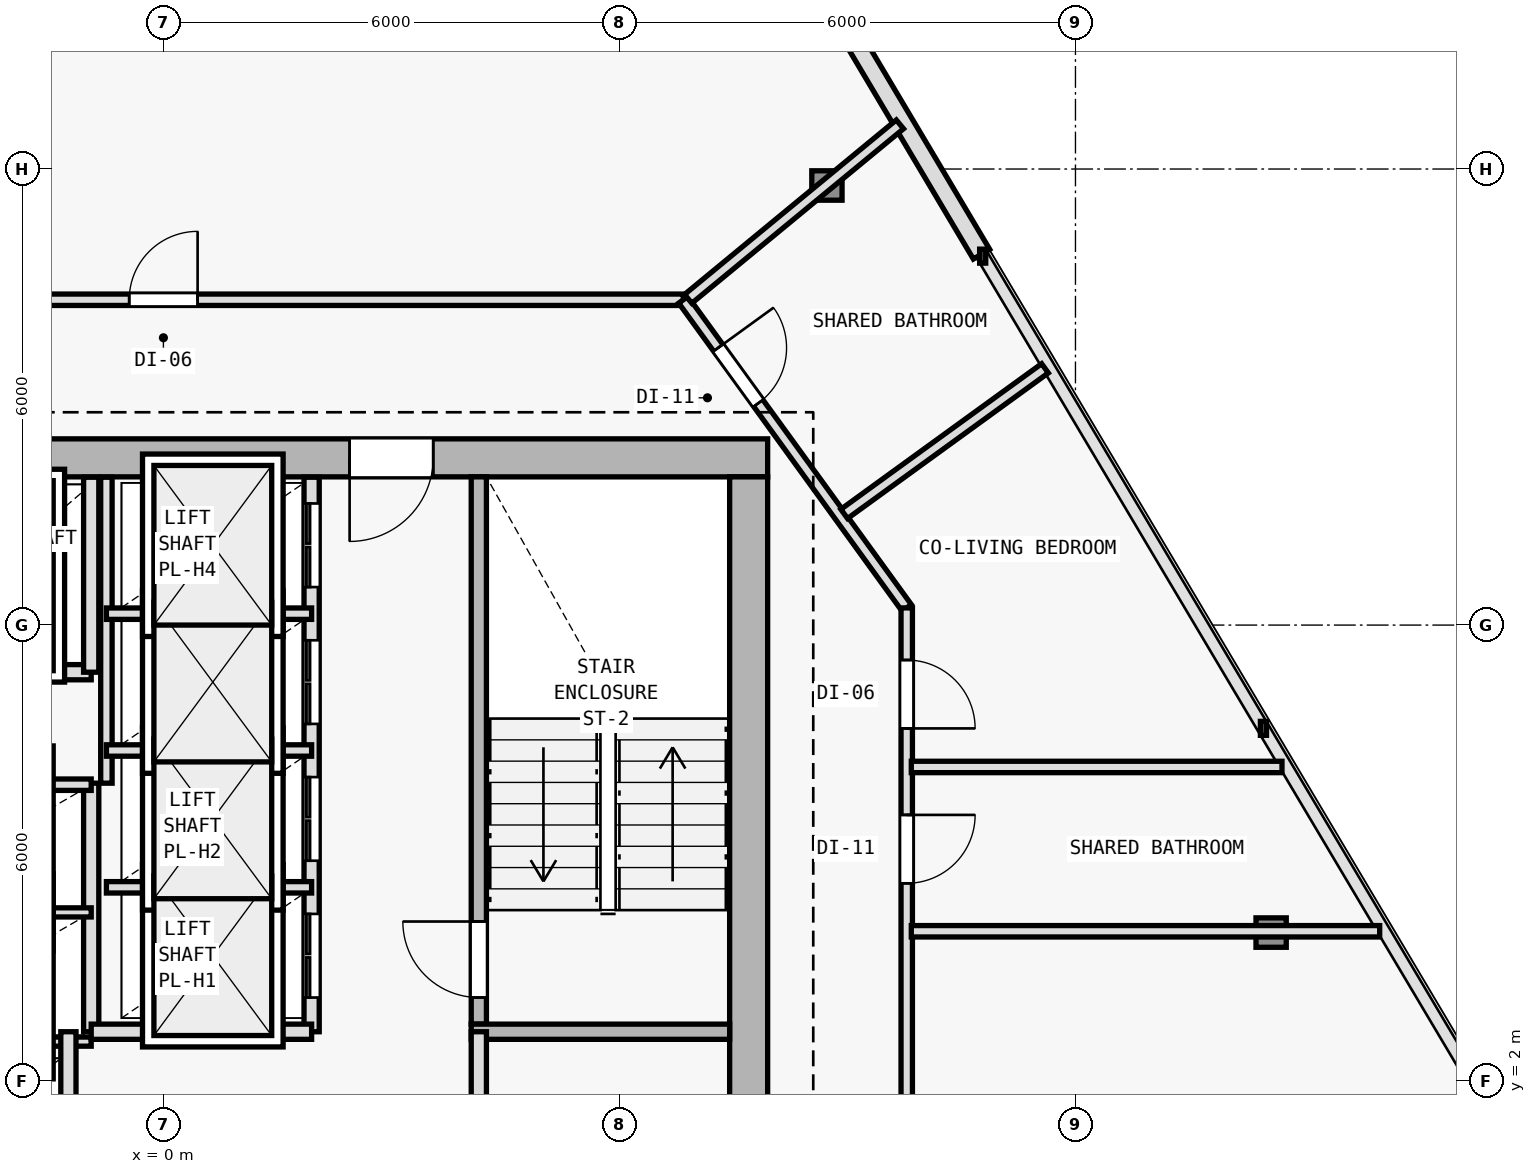
"""IFC4 building model, lengths in metres.
Left out: names, types, materials, properties, quantities, classifications, styles, units other than length and angle.
Written with IfcOpenShell. Run it as: python <this file> out.ifc"""

import sys

from ifc_helpers import new_model, si_unit, direction, frame, frame_2d, origin, origin_2d, place, context, subcontext, project, spatial, rectangle, i_section, extrude, element, fill, save


model = new_model("IFC4")
c1 = context("Model", 3, precision=1e-05, world=origin(), true_north=direction((0.0, 1.0)))
c2 = subcontext(c1, "Body", "Model", "MODEL_VIEW")
j1 = project(units=[si_unit("LENGTHUNIT", "METRE"), si_unit("PLANEANGLEUNIT", "RADIAN")], contexts=[c1])
p1 = place(None, origin())
s1 = spatial("IfcSite", under=j1, at=p1, CompositionType="ELEMENT")
p2 = place(p1, origin())
s2 = spatial("IfcBuilding", under=s1, at=p2, CompositionType="ELEMENT")
p3 = place(p2, frame((0.0, 0.0, 216.3)))
s3 = spatial("IfcBuildingStorey", under=s2, at=p3, CompositionType="ELEMENT", Elevation=216.3)
p4 = place(p3, frame((7.7, 10.2, 0.0), z_axis=(0.0, 0.0, 1.0), x_axis=(1.0, 0.0, 0.0)))
e1 = element("IfcColumn", 1, at=p4, inside=s3, PredefinedType="COLUMN", context=c2, shape_type="SweptSolid", body=[
    extrude(i_section(OverallWidth=0.398, OverallDepth=0.387, WebThickness=0.013, FlangeThickness=0.022, FilletRadius=0.015, at=origin_2d()), origin(), (0.0, 0.0, 1.0), 3.6),
])
p5 = place(p3, frame((14.574, 3.955, 0.005), z_axis=(-0.018906041, 0.009521027842, 0.999775930718), x_axis=(-0.449781931574, -0.893138406984, 0.0)))
e2 = element("IfcColumn", 2, at=p5, inside=s3, PredefinedType="COLUMN", context=c2, shape_type="SweptSolid", body=[
    extrude(i_section(OverallWidth=0.398, OverallDepth=0.387, WebThickness=0.013, FlangeThickness=0.022, FilletRadius=0.015, at=origin_2d()), origin(), (0.0, 0.0, 1.0), 3.59),
])
p6 = place(p3, frame((8.73, 13.783, 0.005), z_axis=(-0.011767054935, -0.002516653368, 0.999927598816), x_axis=(0.209143047003, -0.977885057607, 0.0)))
e3 = element("IfcColumn", 3, at=p6, inside=s3, PredefinedType="COLUMN", context=c2, shape_type="SweptSolid", body=[
    extrude(i_section(OverallWidth=0.398, OverallDepth=0.387, WebThickness=0.013, FlangeThickness=0.022, FilletRadius=0.015, at=origin_2d()), origin(), (0.0, 0.0, 1.0), 3.589),
])
p7 = place(p3, frame((5.551, 21.647, 0.0), z_axis=(0.0, 0.0, 1.0), x_axis=(0.511094988088, -0.859524236512, 0.0)))
e4 = element("IfcWall", 4, at=p7, inside=s3, PredefinedType="SOLIDWALL", context=c2, shape_type="SweptSolid", body=[
    extrude(rectangle(XDim=10.2, YDim=0.25, at=frame_2d((5.1, 0.0))), origin(), (0.0, 0.0, 1.0), 3.35),
])
p8 = place(p7, frame((4.3, 0.0, 0.62)))
e5 = element("IfcOpeningElement", 5, at=p8, cuts=e4, PredefinedType="OPENING", context=c2, shape_type="SweptSolid", body=[
    extrude(rectangle(XDim=1.6, YDim=2.1, at=frame_2d((0.8, 1.05))), frame((0.0, 0.135, 0.0), z_axis=(0.0, -1.0, 0.0), x_axis=(1.0, 0.0, 0.0)), (0.0, 0.0, 1.0), 0.27),
])
p9 = place(p3, frame((7.95, 10.2, 0.0), z_axis=(0.0, 0.0, 1.0), x_axis=(-1.0, 0.0, 0.0)))
e6 = element("IfcWall", 6, at=p9, inside=s3, PredefinedType="SHEAR", context=c2, shape_type="SweptSolid", body=[
    extrude(rectangle(XDim=15.9, YDim=0.5, at=frame_2d((7.95, 0.0))), origin(), (0.0, 0.0, 1.0), 3.35),
])
p10 = place(p9, frame((4.4, 0.0, 0.0)))
e7 = element("IfcOpeningElement", 7, at=p10, cuts=e6, PredefinedType="OPENING", context=c2, shape_type="SweptSolid", body=[
    extrude(rectangle(XDim=1.1, YDim=2.15, at=frame_2d((0.55, 1.075))), frame((0.0, 0.26, 0.0), z_axis=(0.0, -1.0, 0.0), x_axis=(1.0, 0.0, 0.0)), (0.0, 0.0, 1.0), 0.52),
])
p11 = place(p3, frame((7.7, 9.95, 0.0), z_axis=(0.0, 0.0, 1.0), x_axis=(0.0, -1.0, 0.0)))
e8 = element("IfcWall", 8, at=p11, inside=s3, PredefinedType="SHEAR", context=c2, shape_type="SweptSolid", body=[
    extrude(rectangle(XDim=19.1, YDim=0.5, at=frame_2d((9.55, 0.0))), origin(), (0.0, 0.0, 1.0), 3.35),
])
p12 = place(p3, frame((4.15, 2.75, 0.0), z_axis=(0.0, 0.0, 1.0), x_axis=(0.0, 1.0, 0.0)))
e9 = element("IfcWall", 9, at=p12, inside=s3, PredefinedType="SOLIDWALL", context=c2, shape_type="SweptSolid", body=[
    extrude(rectangle(XDim=7.2, YDim=0.2, at=frame_2d((3.6, 0.0))), origin(), (0.0, 0.0, 1.0), 3.35),
])
p13 = place(p12, frame((0.35, 0.0, 0.0)))
e10 = element("IfcOpeningElement", 10, at=p13, cuts=e9, PredefinedType="OPENING", context=c2, shape_type="SweptSolid", body=[
    extrude(rectangle(XDim=1.0, YDim=2.15, at=frame_2d((0.5, 1.075))), frame((0.0, 0.11, 0.0), z_axis=(0.0, -1.0, 0.0), x_axis=(1.0, 0.0, 0.0)), (0.0, 0.0, 1.0), 0.22),
])
p14 = place(p3, frame((4.05, 2.65, 0.0), z_axis=(0.0, 0.0, 1.0), x_axis=(1.0, 0.0, 0.0)))
e11 = element("IfcWall", 11, at=p14, inside=s3, PredefinedType="SOLIDWALL", context=c2, shape_type="SweptSolid", body=[
    extrude(rectangle(XDim=3.4, YDim=0.2, at=frame_2d((1.7, 0.0))), origin(), (0.0, 0.0, 1.0), 3.35),
])
p15 = place(p3, frame((-0.95, 2.65, 0.0), z_axis=(0.0, 0.0, 1.0), x_axis=(0.0, 1.0, 0.0)))
e12 = element("IfcWall", 12, at=p15, inside=s3, PredefinedType="SOLIDWALL", context=c2, shape_type="SweptSolid", body=[
    extrude(rectangle(XDim=3.27, YDim=0.2, at=frame_2d((1.635, 0.0))), origin(), (0.0, 0.0, 1.0), 3.35),
])
for number, where, z_axis, x_axis in (
    (13, (-3.85, 2.52, 0.0), (0.0, 0.0, 1.0), (1.0, 0.0, 0.0)),
    (14, (-3.85, 4.22, 0.0), (0.0, 0.0, 1.0), (1.0, 0.0, 0.0)),
):
    element("IfcWall", number, at=place(p3, frame(where, z_axis=z_axis, x_axis=x_axis)), inside=s3, PredefinedType="PARTITIONING", context=c2, shape_type="SweptSolid", body=[
        extrude(rectangle(XDim=2.9, YDim=0.12, at=frame_2d((1.45, 0.0))), origin(), (0.0, 0.0, 1.0), 3.35),
    ])
p16 = place(p3, frame((-3.85, 5.9, 0.0), z_axis=(0.0, 0.0, 1.0), x_axis=(1.0, 0.0, 0.0)))
e15 = element("IfcWall", 15, at=p16, inside=s3, PredefinedType="PARTITIONING", context=c2, shape_type="SweptSolid", body=[
    extrude(rectangle(XDim=2.9, YDim=0.15, at=frame_2d((1.45, 0.0))), origin(), (0.0, 0.0, 1.0), 3.35),
])
p17 = place(p3, frame((-3.85, 7.38, 0.0), z_axis=(0.0, 0.0, 1.0), x_axis=(1.0, 0.0, 0.0)))
e16 = element("IfcWall", 16, at=p17, inside=s3, PredefinedType="SOLIDWALL", context=c2, shape_type="SweptSolid", body=[
    extrude(rectangle(XDim=2.9, YDim=0.2, at=frame_2d((1.45, 0.0))), origin(), (0.0, 0.0, 1.0), 3.35),
])
p18 = place(p17, frame((0.85, 0.0, 0.0)))
e17 = element("IfcOpeningElement", 17, at=p18, cuts=e16, PredefinedType="OPENING", context=c2, shape_type="SweptSolid", body=[
    extrude(rectangle(XDim=1.2, YDim=2.2, at=frame_2d((0.6, 1.1))), frame((0.0, 0.11, 0.0), z_axis=(0.0, -1.0, 0.0), x_axis=(1.0, 0.0, 0.0)), (0.0, 0.0, 1.0), 0.22),
])
p19 = place(p3, frame((-0.95, 7.38, 0.0), z_axis=(0.0, 0.0, 1.0), x_axis=(0.0, 1.0, 0.0)))
e18 = element("IfcWall", 18, at=p19, inside=s3, PredefinedType="SOLIDWALL", context=c2, shape_type="SweptSolid", body=[
    extrude(rectangle(XDim=2.565, YDim=0.2, at=frame_2d((1.283, 0.0))), origin(), (0.0, 0.0, 1.0), 3.35),
])
p20 = place(p3, frame((4.15, -6.05, 0.0), z_axis=(0.0, 0.0, 1.0), x_axis=(0.0, 1.0, 0.0)))
e19 = element("IfcWall", 19, at=p20, inside=s3, PredefinedType="SOLIDWALL", context=c2, shape_type="SweptSolid", body=[
    extrude(rectangle(XDim=8.7, YDim=0.2, at=frame_2d((4.35, 0.0))), origin(), (0.0, 0.0, 1.0), 3.35),
])
p21 = place(p20, frame((3.6, 0.0, 0.0)))
e20 = element("IfcOpeningElement", 20, at=p21, cuts=e19, PredefinedType="OPENING", context=c2, shape_type="SweptSolid", body=[
    extrude(rectangle(XDim=0.95, YDim=2.1, at=frame_2d((0.475, 1.05))), frame((0.0, 0.11, 0.0), z_axis=(0.0, -1.0, 0.0), x_axis=(1.0, 0.0, 0.0)), (0.0, 0.0, 1.0), 0.22),
])
p22 = place(p3, frame((-1.25, -6.05, 0.0), z_axis=(0.0, 0.0, 1.0), x_axis=(0.0, 1.0, 0.0)))
e21 = element("IfcWall", 21, at=p22, inside=s3, PredefinedType="SOLIDWALL", context=c2, shape_type="SweptSolid", body=[
    extrude(rectangle(XDim=8.7, YDim=0.2, at=frame_2d((4.35, 0.0))), origin(), (0.0, 0.0, 1.0), 3.35),
])
p23 = place(p3, frame((1.95, 2.65, 0.0), z_axis=(0.0, 0.0, 1.0), x_axis=(0.0, 1.0, 0.0)))
e22 = element("IfcWall", 22, at=p23, inside=s3, PredefinedType="SOLIDWALL", context=c2, shape_type="SweptSolid", body=[
    extrude(rectangle(XDim=7.295, YDim=0.2, at=frame_2d((3.647, 0.0))), origin(), (0.0, 0.0, 1.0), 3.35),
])
p24 = place(p23, frame((0.45, 0.0, 0.0)))
e23 = element("IfcOpeningElement", 23, at=p24, cuts=e22, PredefinedType="OPENING", context=c2, shape_type="SweptSolid", body=[
    extrude(rectangle(XDim=1.1, YDim=2.15, at=frame_2d((0.55, 1.075))), frame((0.0, 0.11, 0.0), z_axis=(0.0, -1.0, 0.0), x_axis=(1.0, 0.0, 0.0)), (0.0, 0.0, 1.0), 0.22),
])
p25 = place(p23, frame((2.25, 0.0, 0.0)))
e24 = element("IfcOpeningElement", 24, at=p25, cuts=e22, PredefinedType="OPENING", context=c2, shape_type="SweptSolid", body=[
    extrude(rectangle(XDim=1.1, YDim=2.15, at=frame_2d((0.55, 1.075))), frame((0.0, 0.11, 0.0), z_axis=(0.0, -1.0, 0.0), x_axis=(1.0, 0.0, 0.0)), (0.0, 0.0, 1.0), 0.22),
])
p26 = place(p23, frame((4.05, 0.0, 0.0)))
e25 = element("IfcOpeningElement", 25, at=p26, cuts=e22, PredefinedType="OPENING", context=c2, shape_type="SweptSolid", body=[
    extrude(rectangle(XDim=1.1, YDim=2.15, at=frame_2d((0.55, 1.075))), frame((0.0, 0.11, 0.0), z_axis=(0.0, -1.0, 0.0), x_axis=(1.0, 0.0, 0.0)), (0.0, 0.0, 1.0), 0.22),
])
p27 = place(p23, frame((5.85, 0.0, 0.0)))
e26 = element("IfcOpeningElement", 26, at=p27, cuts=e22, PredefinedType="OPENING", context=c2, shape_type="SweptSolid", body=[
    extrude(rectangle(XDim=1.1, YDim=2.15, at=frame_2d((0.55, 1.075))), frame((0.0, 0.11, 0.0), z_axis=(0.0, -1.0, 0.0), x_axis=(1.0, 0.0, 0.0)), (0.0, 0.0, 1.0), 0.22),
])
p28 = place(p3, frame((-0.95, 2.65, 0.0), z_axis=(0.0, 0.0, 1.0), x_axis=(1.0, 0.0, 0.0)))
e27 = element("IfcWall", 27, at=p28, inside=s3, PredefinedType="SOLIDWALL", context=c2, shape_type="SweptSolid", body=[
    extrude(rectangle(XDim=2.9, YDim=0.2, at=frame_2d((1.45, 0.0))), origin(), (0.0, 0.0, 1.0), 3.35),
])
p29 = place(p3, frame((-0.75, 5.92, 0.0), z_axis=(0.0, 0.0, 1.0), x_axis=(0.0, 1.0, 0.0)))
e28 = element("IfcWall", 28, at=p29, inside=s3, PredefinedType="PARTITIONING", context=c2, shape_type="SweptSolid", body=[
    extrude(rectangle(XDim=4.025, YDim=0.15, at=frame_2d((2.013, 0.0))), origin(), (0.0, 0.0, 1.0), 3.35),
])
for number, where, z_axis, x_axis in (
    (29, (-0.75, 4.55, 0.0), (0.0, 0.0, 1.0), (1.0, 0.0, 0.0)),
    (30, (-0.75, 6.35, 0.0), (0.0, 0.0, 1.0), (1.0, 0.0, 0.0)),
    (31, (-0.75, 8.15, 0.0), (0.0, 0.0, 1.0), (1.0, 0.0, 0.0)),
):
    element("IfcWall", number, at=place(p3, frame(where, z_axis=z_axis, x_axis=x_axis)), inside=s3, PredefinedType="PARTITIONING", context=c2, shape_type="SweptSolid", body=[
        extrude(rectangle(XDim=2.7, YDim=0.15, at=frame_2d((1.35, 0.0))), origin(), (0.0, 0.0, 1.0), 3.35),
    ])
p30 = place(p3, frame((-6.841, 12.28, 0.0), z_axis=(0.0, 0.0, 1.0), x_axis=(1.0, 0.0, 0.0)))
e32 = element("IfcWall", 32, at=p30, inside=s3, PredefinedType="PARTITIONING", context=c2, shape_type="SweptSolid", body=[
    extrude(rectangle(XDim=13.682, YDim=0.15, at=frame_2d((6.841, 0.0))), origin(), (0.0, 0.0, 1.0), 3.005),
])
p31 = place(p30, frame((6.391, 0.0, 0.0)))
e33 = element("IfcOpeningElement", 33, at=p31, cuts=e32, PredefinedType="OPENING", context=c2, shape_type="SweptSolid", body=[
    extrude(rectangle(XDim=0.9, YDim=2.1, at=frame_2d((0.45, 1.05))), frame((0.0, 0.085, 0.0), z_axis=(0.0, -1.0, 0.0), x_axis=(1.0, 0.0, 0.0)), (0.0, 0.0, 1.0), 0.17),
])
p32 = place(p3, frame((6.841, 12.28, 0.0), z_axis=(0.0, 0.0, 1.0), x_axis=(0.586956386413, -0.809618552436, 0.0)))
e34 = element("IfcWall", 34, at=p32, inside=s3, PredefinedType="PARTITIONING", context=c2, shape_type="SweptSolid", body=[
    extrude(rectangle(XDim=5.008, YDim=0.15, at=frame_2d((2.504, 0.0))), origin(), (0.0, 0.0, 1.0), 2.775),
])
p33 = place(p32, frame((0.781, 0.0, 0.0)))
e35 = element("IfcOpeningElement", 35, at=p33, cuts=e34, PredefinedType="OPENING", context=c2, shape_type="SweptSolid", body=[
    extrude(rectangle(XDim=0.9, YDim=2.1, at=frame_2d((0.45, 1.05))), frame((0.0, 0.085, 0.0), z_axis=(0.0, -1.0, 0.0), x_axis=(1.0, 0.0, 0.0)), (0.0, 0.0, 1.0), 0.17),
])
p34 = place(p3, frame((9.78, 8.226, 0.0), z_axis=(0.0, 0.0, 1.0), x_axis=(0.0, -1.0, 0.0)))
e36 = element("IfcWall", 36, at=p34, inside=s3, PredefinedType="PARTITIONING", context=c2, shape_type="SweptSolid", body=[
    extrude(rectangle(XDim=19.706, YDim=0.15, at=frame_2d((9.853, 0.0))), origin(), (0.0, 0.0, 1.0), 2.775),
])
p35 = place(p34, frame((11.441, 0.0, 0.0)))
e37 = element("IfcOpeningElement", 37, at=p35, cuts=e36, PredefinedType="OPENING", context=c2, shape_type="SweptSolid", body=[
    extrude(rectangle(XDim=0.9, YDim=2.1, at=frame_2d((0.45, 1.05))), frame((0.0, 0.085, 0.0), z_axis=(0.0, -1.0, 0.0), x_axis=(1.0, 0.0, 0.0)), (0.0, 0.0, 1.0), 0.17),
])
p36 = place(p34, frame((2.723, 0.0, 0.0)))
e38 = element("IfcOpeningElement", 38, at=p36, cuts=e36, PredefinedType="OPENING", context=c2, shape_type="SweptSolid", body=[
    extrude(rectangle(XDim=0.9, YDim=2.1, at=frame_2d((0.45, 1.05))), frame((0.0, 0.085, 0.0), z_axis=(0.0, -1.0, 0.0), x_axis=(1.0, 0.0, 0.0)), (0.0, 0.0, 1.0), 0.17),
])
p37 = place(p34, frame((0.685, 0.0, 0.0)))
e39 = element("IfcOpeningElement", 39, at=p37, cuts=e36, PredefinedType="OPENING", context=c2, shape_type="SweptSolid", body=[
    extrude(rectangle(XDim=0.9, YDim=2.1, at=frame_2d((0.45, 1.05))), frame((0.0, 0.085, 0.0), z_axis=(0.0, -1.0, 0.0), x_axis=(1.0, 0.0, 0.0)), (0.0, 0.0, 1.0), 0.17),
])
p38 = place(p3, frame((9.84, 3.972, 0.0), z_axis=(0.0, 0.0, 1.0), x_axis=(1.0, 0.0, 0.0)))
e40 = element("IfcWall", 40, at=p38, inside=s3, PredefinedType="PARTITIONING", context=c2, shape_type="SweptSolid", body=[
    extrude(rectangle(XDim=6.163, YDim=0.15, at=frame_2d((3.081, 0.0))), origin(), (0.0, 0.0, 1.0), 2.775),
])
p39 = place(p3, frame((6.905, 12.292, 0.0), z_axis=(0.0, 0.0, 1.0), x_axis=(0.771752517436, 0.63592299206, 0.0)))
e41 = element("IfcWall", 41, at=p39, inside=s3, PredefinedType="PARTITIONING", context=c2, shape_type="SweptSolid", body=[
    extrude(rectangle(XDim=3.609, YDim=0.15, at=frame_2d((1.805, 0.0))), origin(), (0.0, 0.0, 1.0), 2.975),
])
p40 = place(p3, frame((8.958, 9.463, 0.0), z_axis=(0.0, 0.0, 1.0), x_axis=(0.809638003547, 0.58692955558, 0.0)))
e42 = element("IfcWall", 42, at=p40, inside=s3, PredefinedType="PARTITIONING", context=c2, shape_type="SweptSolid", body=[
    extrude(rectangle(XDim=3.262, YDim=0.15, at=frame_2d((1.631, 0.0))), origin(), (0.0, 0.0, 1.0), 2.775),
])
p41 = place(p3, frame((9.84, 6.133, 0.0), z_axis=(0.0, 0.0, 1.0), x_axis=(1.0, 0.0, 0.0)))
e43 = element("IfcWall", 43, at=p41, inside=s3, PredefinedType="PARTITIONING", context=c2, shape_type="SweptSolid", body=[
    extrude(rectangle(XDim=4.877, YDim=0.15, at=frame_2d((2.438, 0.0))), origin(), (0.0, 0.0, 1.0), 2.775),
])
p42 = place(p10, origin())
e44 = element("IfcDoor", 44, at=p42, inside=s3, OperationType="SINGLE_SWING_RIGHT", PredefinedType="DOOR", context=c2, shape_type="SweptSolid", body=[
    extrude(rectangle(XDim=1.1, YDim=2.15, at=frame_2d((0.55, 1.075))), frame((0.0, 0.025, 0.0), z_axis=(0.0, -1.0, 0.0), x_axis=(1.0, 0.0, 0.0)), (0.0, 0.0, 1.0), 0.05),
])
fill(e7, e44)
p43 = place(p13, origin())
e45 = element("IfcDoor", 45, at=p43, inside=s3, OperationType="SINGLE_SWING_RIGHT", PredefinedType="DOOR", context=c2, shape_type="SweptSolid", body=[
    extrude(rectangle(XDim=1.0, YDim=2.15, at=frame_2d((0.5, 1.075))), frame((0.0, 0.025, 0.0), z_axis=(0.0, -1.0, 0.0), x_axis=(1.0, 0.0, 0.0)), (0.0, 0.0, 1.0), 0.05),
])
fill(e10, e45)
p44 = place(p24, origin())
e46 = element("IfcDoor", 46, at=p44, inside=s3, OperationType="DOUBLE_DOOR_SLIDING", PredefinedType="DOOR", context=c2, shape_type="SweptSolid", body=[
    extrude(rectangle(XDim=1.1, YDim=2.15, at=frame_2d((0.55, 1.075))), frame((0.0, 0.025, 0.0), z_axis=(0.0, -1.0, 0.0), x_axis=(1.0, 0.0, 0.0)), (0.0, 0.0, 1.0), 0.05),
])
fill(e23, e46)
p45 = place(p25, origin())
e47 = element("IfcDoor", 47, at=p45, inside=s3, OperationType="DOUBLE_DOOR_SLIDING", PredefinedType="DOOR", context=c2, shape_type="SweptSolid", body=[
    extrude(rectangle(XDim=1.1, YDim=2.15, at=frame_2d((0.55, 1.075))), frame((0.0, 0.025, 0.0), z_axis=(0.0, -1.0, 0.0), x_axis=(1.0, 0.0, 0.0)), (0.0, 0.0, 1.0), 0.05),
])
fill(e24, e47)
p46 = place(p26, origin())
e48 = element("IfcDoor", 48, at=p46, inside=s3, OperationType="DOUBLE_DOOR_SLIDING", PredefinedType="DOOR", context=c2, shape_type="SweptSolid", body=[
    extrude(rectangle(XDim=1.1, YDim=2.15, at=frame_2d((0.55, 1.075))), frame((0.0, 0.025, 0.0), z_axis=(0.0, -1.0, 0.0), x_axis=(1.0, 0.0, 0.0)), (0.0, 0.0, 1.0), 0.05),
])
fill(e25, e48)
p47 = place(p27, origin())
e49 = element("IfcDoor", 49, at=p47, inside=s3, OperationType="DOUBLE_DOOR_SLIDING", PredefinedType="DOOR", context=c2, shape_type="SweptSolid", body=[
    extrude(rectangle(XDim=1.1, YDim=2.15, at=frame_2d((0.55, 1.075))), frame((0.0, 0.025, 0.0), z_axis=(0.0, -1.0, 0.0), x_axis=(1.0, 0.0, 0.0)), (0.0, 0.0, 1.0), 0.05),
])
fill(e26, e49)
p48 = place(p36, origin())
e50 = element("IfcDoor", 50, at=p48, inside=s3, OperationType="SINGLE_SWING_LEFT", PredefinedType="DOOR", context=c2, shape_type="SweptSolid", body=[
    extrude(rectangle(XDim=0.9, YDim=2.1, at=frame_2d((0.45, 1.05))), frame((0.0, 0.025, 0.0), z_axis=(0.0, -1.0, 0.0), x_axis=(1.0, 0.0, 0.0)), (0.0, 0.0, 1.0), 0.05),
])
fill(e38, e50)
p49 = place(p37, origin())
e51 = element("IfcDoor", 51, at=p49, inside=s3, OperationType="SINGLE_SWING_RIGHT", PredefinedType="DOOR", context=c2, shape_type="SweptSolid", body=[
    extrude(rectangle(XDim=0.9, YDim=2.1, at=frame_2d((0.45, 1.05))), frame((0.0, 0.025, 0.0), z_axis=(0.0, -1.0, 0.0), x_axis=(1.0, 0.0, 0.0)), (0.0, 0.0, 1.0), 0.05),
])
fill(e39, e51)
p50 = place(p33, origin())
e52 = element("IfcDoor", 52, at=p50, inside=s3, OperationType="SINGLE_SWING_LEFT", PredefinedType="DOOR", context=c2, shape_type="SweptSolid", body=[
    extrude(rectangle(XDim=0.9, YDim=2.1, at=frame_2d((0.45, 1.05))), frame((0.0, 0.025, 0.0), z_axis=(0.0, -1.0, 0.0), x_axis=(1.0, 0.0, 0.0)), (0.0, 0.0, 1.0), 0.05),
])
fill(e35, e52)
p51 = place(p31, origin())
e53 = element("IfcDoor", 53, at=p51, inside=s3, OperationType="SINGLE_SWING_RIGHT", PredefinedType="DOOR", context=c2, shape_type="SweptSolid", body=[
    extrude(rectangle(XDim=0.9, YDim=2.1, at=frame_2d((0.45, 1.05))), frame((0.0, 0.025, 0.0), z_axis=(0.0, -1.0, 0.0), x_axis=(1.0, 0.0, 0.0)), (0.0, 0.0, 1.0), 0.05),
])
fill(e33, e53)
save(model, sys.argv[1])
